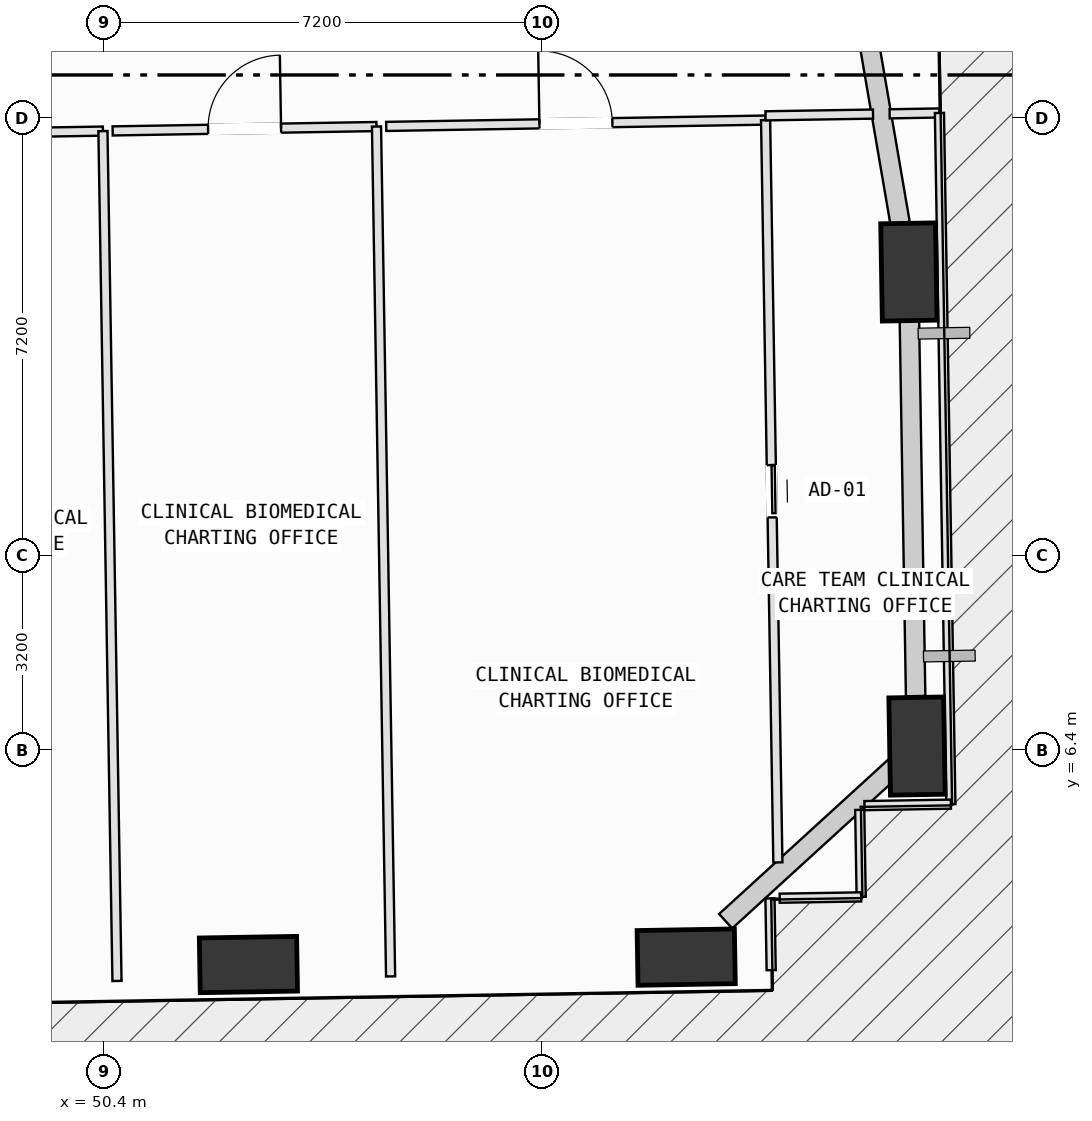
"""IFC4 building model, lengths in metres.
Left out: names, types, materials, properties, quantities, classifications, styles, units other than length and angle.
Written with IfcOpenShell. Run it as: python <this file> out.ifc"""

import sys

from ifc_helpers import new_model, si_unit, direction, frame, frame_2d, origin, origin_2d, place, context, subcontext, project, spatial, rectangle, extrude, element, fill, save


model = new_model("IFC4")
c1 = context("Model", 3, precision=1e-05, world=origin(), true_north=direction((0.0, 1.0)))
c2 = subcontext(c1, "Body", "Model", "MODEL_VIEW")
j1 = project(units=[si_unit("LENGTHUNIT", "METRE"), si_unit("PLANEANGLEUNIT", "RADIAN")], contexts=[c1])
p1 = place(None, origin())
s1 = spatial("IfcSite", under=j1, at=p1, CompositionType="ELEMENT")
p2 = place(p1, origin())
s2 = spatial("IfcBuilding", under=s1, at=p2, CompositionType="ELEMENT")
p3 = place(p2, frame((0.0, 0.0, 27.0)))
s3 = spatial("IfcBuildingStorey", under=s2, at=p3, CompositionType="ELEMENT", Elevation=27.0)
p4 = place(p3, frame((52.771, 2.869, 0.058), z_axis=(0.089627245937, 0.079600313138, 0.992789376924), x_axis=(-0.676261234577, 0.736659210637, 0.001987458964)))
e1 = element("IfcColumn", 1, at=p4, inside=s3, PredefinedType="COLUMN", context=c2, shape_type="SweptSolid", body=[
    extrude(rectangle(XDim=1.6, YDim=0.9, at=origin_2d()), origin(), (0.0, 0.0, 1.0), 3.969),
])
p5 = place(p3, frame((59.971, 2.991, 0.068), z_axis=(0.088615873193, 0.108971080706, 0.990087132826), x_axis=(-0.786096345824, 0.61809959728, 0.002328717264)))
e2 = element("IfcColumn", 2, at=p5, inside=s3, PredefinedType="COLUMN", context=c2, shape_type="SweptSolid", body=[
    extrude(rectangle(XDim=1.6, YDim=0.9, at=origin_2d()), origin(), (0.0, 0.0, 1.0), 3.97),
])
p6 = place(p3, frame((63.767, 6.462, 0.119), z_axis=(0.074234646943, 0.124305667197, 0.989463146507), x_axis=(-0.493016569743, -0.8578914516, 0.144765048372)))
e3 = element("IfcColumn", 3, at=p6, inside=s3, PredefinedType="COLUMN", context=c2, shape_type="SweptSolid", body=[
    extrude(rectangle(XDim=1.6, YDim=0.9, at=origin_2d()), origin(), (0.0, 0.0, 1.0), 3.92),
])
p7 = place(p3, frame((63.634, 14.26, 0.108), z_axis=(0.042309468118, 0.123755194246, 0.9914103897), x_axis=(-0.304985990688, -0.943335999757, 0.130769786443)))
e4 = element("IfcColumn", 4, at=p7, inside=s3, PredefinedType="COLUMN", context=c2, shape_type="SweptSolid", body=[
    extrude(rectangle(XDim=1.6, YDim=0.9, at=origin_2d()), origin(), (0.0, 0.0, 1.0), 3.924),
])
p8 = place(p3, frame((63.521, 6.231, 0.0), z_axis=(0.0, 0.0, 1.0), x_axis=(-0.738453195847, -0.674304736409, 0.0)))
e5 = element("IfcWall", 5, at=p8, inside=s3, PredefinedType="SOLIDWALL", context=c2, shape_type="SweptSolid", body=[
    extrude(rectangle(XDim=3.928, YDim=0.32, at=frame_2d((1.964, 0.0))), origin(), (0.0, 0.0, 1.0), 3.165),
])
p9 = place(p3, frame((63.635, 13.893, 0.0), z_axis=(0.0, 0.0, 1.0), x_axis=(0.016583733653, -0.999862480433, 0.0)))
e6 = element("IfcWall", 6, at=p9, inside=s3, PredefinedType="SOLIDWALL", context=c2, shape_type="SweptSolid", body=[
    extrude(rectangle(XDim=6.61, YDim=0.32, at=frame_2d((3.305, 0.0))), origin(), (0.0, 0.0, 1.0), 3.165),
])
p10 = place(p3, frame((62.032, 23.55, 0.0), z_axis=(0.0, 0.0, 1.0), x_axis=(0.169181724712, -0.985584874084, 0.0)))
e7 = element("IfcWall", 7, at=p10, inside=s3, PredefinedType="SOLIDWALL", context=c2, shape_type="SweptSolid", body=[
    extrude(rectangle(XDim=8.614, YDim=0.32, at=frame_2d((4.307, 0.0))), origin(), (0.0, 0.0, 1.0), 3.165),
])
p11 = place(p3, frame((46.039, 16.505, 0.0), z_axis=(0.0, 0.0, 1.0), x_axis=(0.999862324628, 0.016593124762, 0.0)))
e8 = element("IfcWall", 8, at=p11, inside=s3, PredefinedType="PARTITIONING", context=c2, shape_type="SweptSolid", body=[
    extrude(rectangle(XDim=4.34, YDim=0.15, at=frame_2d((2.17, 0.0))), origin(), (0.0, 0.0, 1.0), 2.765),
])
p12 = place(p11, frame((1.57, 0.0, 0.0)))
e9 = element("IfcOpeningElement", 9, at=p12, cuts=e8, PredefinedType="OPENING", context=c2, shape_type="SweptSolid", body=[
    extrude(rectangle(XDim=1.2, YDim=2.15, at=frame_2d((0.6, 1.075))), frame((0.0, 0.085, 0.0), z_axis=(0.0, -1.0, 0.0), x_axis=(1.0, 0.0, 0.0)), (0.0, 0.0, 1.0), 0.17),
])
p13 = place(p3, frame((50.379, 16.577, 0.0), z_axis=(0.0, 0.0, 1.0), x_axis=(0.016538355732, -0.999863232042, 0.0)))
e10 = element("IfcWall", 10, at=p13, inside=s3, PredefinedType="PARTITIONING", context=c2, shape_type="SweptSolid", body=[
    extrude(rectangle(XDim=13.98, YDim=0.15, at=frame_2d((6.99, 0.0))), origin(), (0.0, 0.0, 1.0), 3.78),
])
p14 = place(p3, frame((50.539, 16.58, 0.0), z_axis=(0.0, 0.0, 1.0), x_axis=(0.99986226266, 0.0165968584, 0.0)))
e11 = element("IfcWall", 11, at=p14, inside=s3, PredefinedType="PARTITIONING", context=c2, shape_type="SweptSolid", body=[
    extrude(rectangle(XDim=4.339, YDim=0.15, at=frame_2d((2.17, 0.0))), origin(), (0.0, 0.0, 1.0), 3.78),
])
p15 = place(p14, frame((1.57, 0.0, 0.0)))
e12 = element("IfcOpeningElement", 12, at=p15, cuts=e11, PredefinedType="OPENING", context=c2, shape_type="SweptSolid", body=[
    extrude(rectangle(XDim=1.2, YDim=2.15, at=frame_2d((0.6, 1.075))), frame((0.0, 0.085, 0.0), z_axis=(0.0, -1.0, 0.0), x_axis=(1.0, 0.0, 0.0)), (0.0, 0.0, 1.0), 0.17),
])
p16 = place(p3, frame((54.878, 16.652, 0.0), z_axis=(0.0, 0.0, 1.0), x_axis=(0.016607902284, -0.99986207928, 0.0)))
e13 = element("IfcWall", 13, at=p16, inside=s3, PredefinedType="PARTITIONING", context=c2, shape_type="SweptSolid", body=[
    extrude(rectangle(XDim=13.98, YDim=0.15, at=frame_2d((6.99, 0.0))), origin(), (0.0, 0.0, 1.0), 3.78),
])
p17 = place(p3, frame((55.038, 16.654, 0.0), z_axis=(0.0, 0.0, 1.0), x_axis=(0.999861085708, 0.016667611916, 0.0)))
e14 = element("IfcWall", 14, at=p17, inside=s3, PredefinedType="PARTITIONING", context=c2, shape_type="SweptSolid", body=[
    extrude(rectangle(XDim=6.24, YDim=0.15, at=frame_2d((3.12, 0.0))), origin(), (0.0, 0.0, 1.0), 3.78),
])
p18 = place(p17, frame((2.52, 0.0, 0.0)))
e15 = element("IfcOpeningElement", 15, at=p18, cuts=e14, PredefinedType="OPENING", context=c2, shape_type="SweptSolid", body=[
    extrude(rectangle(XDim=1.2, YDim=2.15, at=frame_2d((0.6, 1.075))), frame((0.0, 0.085, 0.0), z_axis=(0.0, -1.0, 0.0), x_axis=(1.0, 0.0, 0.0)), (0.0, 0.0, 1.0), 0.17),
])
p19 = place(p3, frame((61.277, 16.758, 0.0), z_axis=(0.0, 0.0, 1.0), x_axis=(0.016535093136, -0.999863286002, 0.0)))
e16 = element("IfcWall", 16, at=p19, inside=s3, PredefinedType="PARTITIONING", context=c2, shape_type="SweptSolid", body=[
    extrude(rectangle(XDim=12.211, YDim=0.15, at=frame_2d((6.105, 0.0))), origin(), (0.0, 0.0, 1.0), 3.78),
])
p20 = place(p19, frame((5.675, 0.0, 0.0)))
e17 = element("IfcOpeningElement", 17, at=p20, cuts=e16, PredefinedType="OPENING", context=c2, shape_type="SweptSolid", body=[
    extrude(rectangle(XDim=0.86, YDim=2.06, at=frame_2d((0.43, 1.03))), frame((0.0, 0.085, 0.0), z_axis=(0.0, -1.0, 0.0), x_axis=(1.0, 0.0, 0.0)), (0.0, 0.0, 1.0), 0.17),
])
p21 = place(p3, frame((61.349, 3.957, 0.0), z_axis=(0.0, 0.0, 1.0), x_axis=(0.016757423204, -0.999859584526, 0.0)))
e18 = element("IfcWall", 18, at=p21, inside=s3, PredefinedType="PARTITIONING", context=c2, shape_type="SweptSolid", body=[
    extrude(rectangle(XDim=1.18, YDim=0.15, at=frame_2d((0.59, 0.0))), origin(), (0.0, 0.0, 1.0), 3.78),
])
p22 = place(p3, frame((62.825, 5.413, 0.0), z_axis=(0.0, 0.0, 1.0), x_axis=(0.016886026044, -0.999857420898, 0.0)))
e19 = element("IfcWall", 19, at=p22, inside=s3, PredefinedType="PARTITIONING", context=c2, shape_type="SweptSolid", body=[
    extrude(rectangle(XDim=1.431, YDim=0.15, at=frame_2d((0.716, 0.0))), origin(), (0.0, 0.0, 1.0), 3.78),
])
p23 = place(p3, frame((62.849, 3.982, 0.0), z_axis=(0.0, 0.0, 1.0), x_axis=(-0.999865605652, -0.016394225635, 0.0)))
e20 = element("IfcWall", 20, at=p23, inside=s3, PredefinedType="PARTITIONING", context=c2, shape_type="SweptSolid", body=[
    extrude(rectangle(XDim=1.34, YDim=0.15, at=frame_2d((0.67, 0.0))), origin(), (0.0, 0.0, 1.0), 3.78),
])
p24 = place(p3, frame((61.276, 16.828, 0.0), z_axis=(0.0, 0.0, 1.0), x_axis=(0.999865023255, 0.016429706955, 0.0)))
e21 = element("IfcWall", 21, at=p24, inside=s3, PredefinedType="PARTITIONING", context=c2, shape_type="SweptSolid", body=[
    extrude(rectangle(XDim=1.768, YDim=0.15, at=frame_2d((0.884, 0.0))), origin(), (0.0, 0.0, 1.0), 3.78),
])
p25 = place(p3, frame((63.317, 16.861, 0.0), z_axis=(0.0, 0.0, 1.0), x_axis=(0.999855708529, 0.01698711636, 0.0)))
e22 = element("IfcWall", 22, at=p25, inside=s3, PredefinedType="PARTITIONING", context=c2, shape_type="SweptSolid", body=[
    extrude(rectangle(XDim=0.819, YDim=0.15, at=frame_2d((0.41, 0.0))), origin(), (0.0, 0.0, 1.0), 3.78),
])
p26 = place(p3, frame((64.136, 16.875, 0.0), z_axis=(0.0, 0.0, 1.0), x_axis=(0.016534474542, -0.999863296232, 0.0)))
e23 = element("IfcWall", 23, at=p26, inside=s3, PredefinedType="PARTITIONING", context=c2, shape_type="SweptSolid", body=[
    extrude(rectangle(XDim=11.369, YDim=0.15, at=frame_2d((5.685, 0.0))), origin(), (0.0, 0.0, 1.0), 3.165),
])
p27 = place(p3, frame((64.324, 5.507, 0.0), z_axis=(0.0, 0.0, 1.0), x_axis=(-0.999855356078, -0.017007848841, 0.0)))
e24 = element("IfcWall", 24, at=p27, inside=s3, PredefinedType="PARTITIONING", context=c2, shape_type="SweptSolid", body=[
    extrude(rectangle(XDim=1.421, YDim=0.15, at=frame_2d((0.71, 0.0))), origin(), (0.0, 0.0, 1.0), 3.78),
])
p28 = place(p15, origin())
e25 = element("IfcDoor", 25, at=p28, inside=s3, OperationType="SINGLE_SWING_RIGHT", PredefinedType="DOOR", context=c2, shape_type="SweptSolid", body=[
    extrude(rectangle(XDim=1.2, YDim=2.15, at=frame_2d((0.6, 1.075))), frame((0.0, 0.025, 0.0), z_axis=(0.0, -1.0, 0.0), x_axis=(1.0, 0.0, 0.0)), (0.0, 0.0, 1.0), 0.05),
])
fill(e12, e25)
p29 = place(p18, origin())
e26 = element("IfcDoor", 26, at=p29, inside=s3, OperationType="SINGLE_SWING_LEFT", PredefinedType="DOOR", context=c2, shape_type="SweptSolid", body=[
    extrude(rectangle(XDim=1.2, YDim=2.15, at=frame_2d((0.6, 1.075))), frame((0.0, 0.025, 0.0), z_axis=(0.0, -1.0, 0.0), x_axis=(1.0, 0.0, 0.0)), (0.0, 0.0, 1.0), 0.05),
])
fill(e15, e26)
p30 = place(p20, origin())
e27 = element("IfcDoor", 27, at=p30, inside=s3, OperationType="SLIDING_TO_LEFT", PredefinedType="DOOR", context=c2, shape_type="SweptSolid", body=[
    extrude(rectangle(XDim=0.86, YDim=2.06, at=frame_2d((0.43, 1.03))), frame((0.0, 0.025, 0.0), z_axis=(0.0, -1.0, 0.0), x_axis=(1.0, 0.0, 0.0)), (0.0, 0.0, 1.0), 0.05),
])
fill(e17, e27)
save(model, sys.argv[1])
